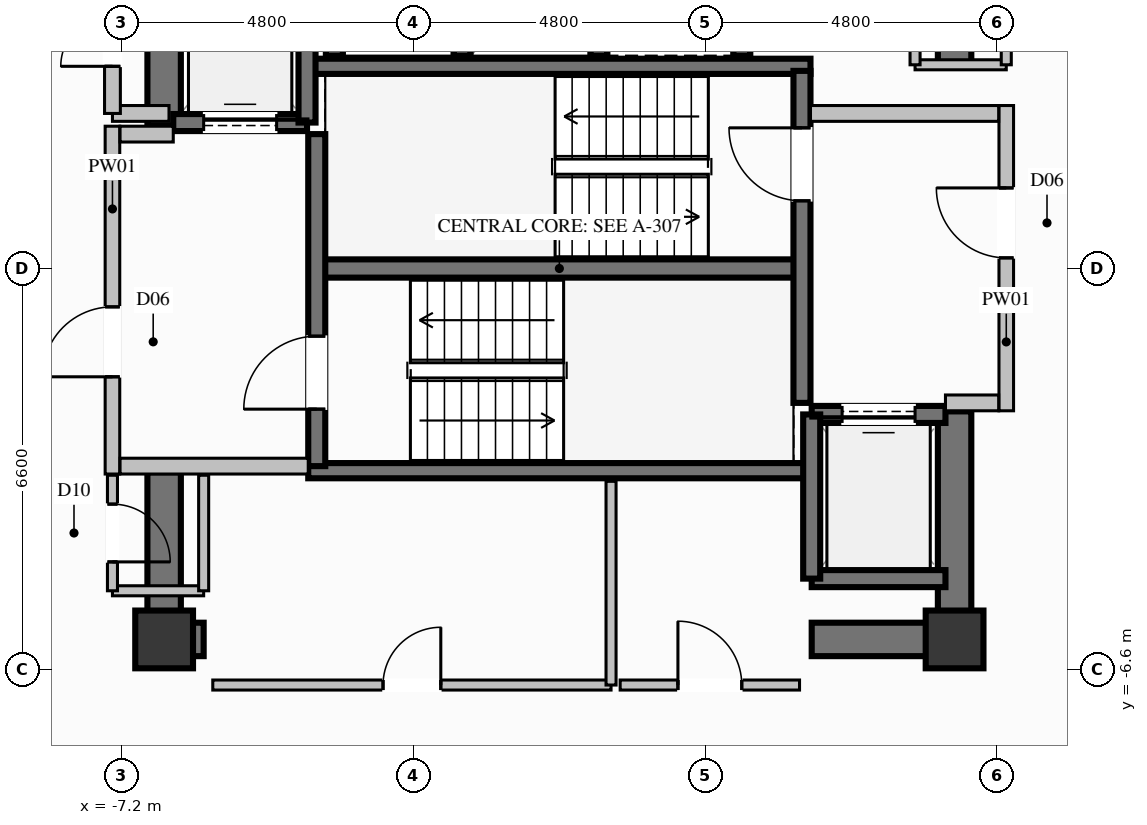
"""IFC4 building model, lengths in metres.
Left out: names, types, materials, properties, quantities, classifications, styles, units other than length and angle.
Written with IfcOpenShell. Run it as: python <this file> out.ifc"""

import sys

from ifc_helpers import new_model, si_unit, direction, frame, frame_2d, origin, origin_2d, place, context, subcontext, project, spatial, rectangle, extrude, element, fill, save


model = new_model("IFC4")
c1 = context("Model", 3, precision=1e-05, world=origin(), true_north=direction((0.0, 1.0)))
c2 = subcontext(c1, "Body", "Model", "MODEL_VIEW")
j1 = project(units=[si_unit("LENGTHUNIT", "METRE"), si_unit("PLANEANGLEUNIT", "RADIAN")], contexts=[c1])
p1 = place(None, origin())
s1 = spatial("IfcSite", under=j1, at=p1, CompositionType="ELEMENT")
p2 = place(p1, origin())
s2 = spatial("IfcBuilding", under=s1, at=p2, CompositionType="ELEMENT")
p3 = place(p2, frame((0.0, 0.0, 209.2)))
s3 = spatial("IfcBuildingStorey", under=s2, at=p3, CompositionType="ELEMENT", Elevation=209.2)
for number, where, z_axis, x_axis in (
    (1, (-6.5, -6.1, 0.0), (0.0, 0.0, 1.0), (1.0, 0.0, 0.0)),
    (2, (6.5, -6.1, 0.0), (0.0, 0.0, 1.0), (1.0, 0.0, 0.0)),
):
    element("IfcColumn", number, at=place(p3, frame(where, z_axis=z_axis, x_axis=x_axis)), inside=s3, PredefinedType="COLUMN", context=c2, shape_type="SweptSolid", body=[
        extrude(rectangle(XDim=0.95, YDim=0.95, at=origin_2d()), origin(), (0.0, 0.0, 1.0), 3.6),
    ])
p4 = place(p3, frame((-3.99, 0.0, 0.0), z_axis=(0.0, 0.0, 1.0), x_axis=(1.0, 0.0, 0.0)))
e3 = element("IfcWall", 3, at=p4, inside=s3, PredefinedType="SHEAR", context=c2, shape_type="SweptSolid", body=[
    extrude(rectangle(XDim=7.98, YDim=0.3, at=frame_2d((3.99, 0.0))), origin(), (0.0, 0.0, 1.0), 3.6),
])
for number, where, z_axis, x_axis in (
    (4, (-4.13, -3.325, 0.0), (0.0, 0.0, 1.0), (1.0, 0.0, 0.0)),
    (5, (-4.13, 3.325, 0.0), (0.0, 0.0, 1.0), (1.0, 0.0, 0.0)),
):
    element("IfcWall", number, at=place(p3, frame(where, z_axis=z_axis, x_axis=x_axis)), inside=s3, PredefinedType="SOLIDWALL", context=c2, shape_type="SweptSolid", body=[
        extrude(rectangle(XDim=8.26, YDim=0.25, at=frame_2d((4.13, 0.0))), origin(), (0.0, 0.0, 1.0), 3.6),
    ])
p5 = place(p3, frame((-6.225, -6.1, 0.0), z_axis=(0.0, 0.0, 1.0), x_axis=(1.0, 0.0, 0.0)))
e6 = element("IfcWall", 6, at=p5, inside=s3, PredefinedType="SHEAR", context=c2, shape_type="SweptSolid", body=[
    extrude(rectangle(XDim=0.375, YDim=0.55, at=frame_2d((0.188, 0.0))), origin(), (0.0, 0.0, 1.0), 3.6),
])
p6 = place(p3, frame((4.15, -6.1, 0.0), z_axis=(0.0, 0.0, 1.0), x_axis=(1.0, 0.0, 0.0)))
e7 = element("IfcWall", 7, at=p6, inside=s3, PredefinedType="SHEAR", context=c2, shape_type="SweptSolid", body=[
    extrude(rectangle(XDim=2.075, YDim=0.55, at=frame_2d((1.038, 0.0))), origin(), (0.0, 0.0, 1.0), 3.6),
])
p7 = place(p3, frame((-6.5, 2.35, 0.0), z_axis=(0.0, 0.0, 1.0), x_axis=(0.0, 1.0, 0.0)))
e8 = element("IfcWall", 8, at=p7, inside=s3, PredefinedType="SHEAR", context=c2, shape_type="SweptSolid", body=[
    extrude(rectangle(XDim=4.025, YDim=0.55, at=frame_2d((2.012, 0.0))), origin(), (0.0, 0.0, 1.0), 3.6),
])
p8 = place(p3, frame((-6.5, -6.375, 0.0), z_axis=(0.0, 0.0, 1.0), x_axis=(0.0, 1.0, 0.0)))
e9 = element("IfcWall", 9, at=p8, inside=s3, PredefinedType="SHEAR", context=c2, shape_type="SweptSolid", body=[
    extrude(rectangle(XDim=3.025, YDim=0.55, at=frame_2d((1.512, 0.0))), origin(), (0.0, 0.0, 1.0), 3.6),
])
p9 = place(p3, frame((6.5, -6.375, 0.0), z_axis=(0.0, 0.0, 1.0), x_axis=(0.0, 1.0, 0.0)))
e10 = element("IfcWall", 10, at=p9, inside=s3, PredefinedType="SHEAR", context=c2, shape_type="SweptSolid", body=[
    extrude(rectangle(XDim=4.025, YDim=0.55, at=frame_2d((2.012, 0.0))), origin(), (0.0, 0.0, 1.0), 3.6),
])
p10 = place(p3, frame((6.5, 3.35, 0.0), z_axis=(0.0, 0.0, 1.0), x_axis=(0.0, 1.0, 0.0)))
e11 = element("IfcWall", 11, at=p10, inside=s3, PredefinedType="SHEAR", context=c2, shape_type="SweptSolid", body=[
    extrude(rectangle(XDim=3.025, YDim=0.55, at=frame_2d((1.512, 0.0))), origin(), (0.0, 0.0, 1.0), 3.6),
])
for number, where, z_axis, x_axis in (
    (12, (-3.7, 6.0, 0.0), (0.0, 0.0, 1.0), (0.0, -1.0, 0.0)),
    (13, (-1.6, 3.5, 0.0), (0.0, 0.0, 1.0), (0.0, 1.0, 0.0)),
    (14, (0.65, 3.5, 0.0), (0.0, 0.0, 1.0), (0.0, 1.0, 0.0)),
    (15, (3.0, 3.5, 0.0), (0.0, 0.0, 1.0), (0.0, 1.0, 0.0)),
):
    element("IfcWall", number, at=place(p3, frame(where, z_axis=z_axis, x_axis=x_axis)), inside=s3, PredefinedType="SOLIDWALL", context=c2, shape_type="SweptSolid", body=[
        extrude(rectangle(XDim=2.5, YDim=0.28, at=frame_2d((1.25, 0.0))), origin(), (0.0, 0.0, 1.0), 3.36),
    ])
p11 = place(p3, frame((-6.35, 2.4, 0.0), z_axis=(0.0, 0.0, 1.0), x_axis=(1.0, 0.0, 0.0)))
e16 = element("IfcWall", 16, at=p11, inside=s3, PredefinedType="SOLIDWALL", context=c2, shape_type="SweptSolid", body=[
    extrude(rectangle(XDim=2.2, YDim=0.28, at=frame_2d((1.1, 0.0))), origin(), (0.0, 0.0, 1.0), 3.36),
])
p12 = place(p11, frame((0.5, 0.0, 0.0)))
e17 = element("IfcOpeningElement", 17, at=p12, cuts=e16, PredefinedType="OPENING", context=c2, shape_type="SweptSolid", body=[
    extrude(rectangle(XDim=1.2, YDim=2.2, at=frame_2d((0.6, 1.1))), frame((0.0, 0.15, 0.0), z_axis=(0.0, -1.0, 0.0), x_axis=(1.0, 0.0, 0.0)), (0.0, 0.0, 1.0), 0.3),
])
p13 = place(p3, frame((-4.15, 2.4, 0.0), z_axis=(0.0, 0.0, 1.0), x_axis=(0.0, 1.0, 0.0)))
e18 = element("IfcWall", 18, at=p13, inside=s3, PredefinedType="SOLIDWALL", context=c2, shape_type="SweptSolid", body=[
    extrude(rectangle(XDim=2.7, YDim=0.28, at=frame_2d((1.35, 0.0))), origin(), (0.0, 0.0, 1.0), 3.36),
])
p14 = place(p3, frame((4.15, -5.1, 0.0), z_axis=(0.0, 0.0, 1.0), x_axis=(1.0, 0.0, 0.0)))
e19 = element("IfcWall", 19, at=p14, inside=s3, PredefinedType="SOLIDWALL", context=c2, shape_type="SweptSolid", body=[
    extrude(rectangle(XDim=2.2, YDim=0.28, at=frame_2d((1.1, 0.0))), origin(), (0.0, 0.0, 1.0), 3.36),
])
p15 = place(p3, frame((6.35, -2.4, 0.0), z_axis=(0.0, 0.0, 1.0), x_axis=(-1.0, 0.0, 0.0)))
e20 = element("IfcWall", 20, at=p15, inside=s3, PredefinedType="SOLIDWALL", context=c2, shape_type="SweptSolid", body=[
    extrude(rectangle(XDim=2.2, YDim=0.28, at=frame_2d((1.1, 0.0))), origin(), (0.0, 0.0, 1.0), 3.36),
])
p16 = place(p15, frame((0.5, 0.0, 0.0)))
e21 = element("IfcOpeningElement", 21, at=p16, cuts=e20, PredefinedType="OPENING", context=c2, shape_type="SweptSolid", body=[
    extrude(rectangle(XDim=1.2, YDim=2.2, at=frame_2d((0.6, 1.1))), frame((0.0, 0.15, 0.0), z_axis=(0.0, -1.0, 0.0), x_axis=(1.0, 0.0, 0.0)), (0.0, 0.0, 1.0), 0.3),
])
p17 = place(p3, frame((4.15, -2.4, 0.0), z_axis=(0.0, 0.0, 1.0), x_axis=(0.0, -1.0, 0.0)))
e22 = element("IfcWall", 22, at=p17, inside=s3, PredefinedType="SOLIDWALL", context=c2, shape_type="SweptSolid", body=[
    extrude(rectangle(XDim=2.7, YDim=0.28, at=frame_2d((1.35, 0.0))), origin(), (0.0, 0.0, 1.0), 3.36),
])
p18 = place(p3, frame((-3.99, -3.25, 0.0), z_axis=(0.0, 0.0, 1.0), x_axis=(0.0, 1.0, 0.0)))
e23 = element("IfcWall", 23, at=p18, inside=s3, PredefinedType="SOLIDWALL", context=c2, shape_type="SweptSolid", body=[
    extrude(rectangle(XDim=5.46, YDim=0.28, at=frame_2d((2.73, 0.0))), origin(), (0.0, 0.0, 1.0), 3.36),
])
p19 = place(p18, frame((0.937, 0.0, 0.0)))
e24 = element("IfcOpeningElement", 24, at=p19, cuts=e23, PredefinedType="OPENING", context=c2, shape_type="SweptSolid", body=[
    extrude(rectangle(XDim=1.2, YDim=2.2, at=frame_2d((0.6, 1.1))), frame((0.0, 0.15, 0.0), z_axis=(0.0, -1.0, 0.0), x_axis=(1.0, 0.0, 0.0)), (0.0, 0.0, 1.0), 0.3),
])
p20 = place(p3, frame((3.99, -2.21, 0.0), z_axis=(0.0, 0.0, 1.0), x_axis=(0.0, 1.0, 0.0)))
e25 = element("IfcWall", 25, at=p20, inside=s3, PredefinedType="SOLIDWALL", context=c2, shape_type="SweptSolid", body=[
    extrude(rectangle(XDim=5.46, YDim=0.28, at=frame_2d((2.73, 0.0))), origin(), (0.0, 0.0, 1.0), 3.36),
])
p21 = place(p20, frame((3.323, 0.0, 0.0)))
e26 = element("IfcOpeningElement", 26, at=p21, cuts=e25, PredefinedType="OPENING", context=c2, shape_type="SweptSolid", body=[
    extrude(rectangle(XDim=1.2, YDim=2.2, at=frame_2d((0.6, 1.1))), frame((0.0, 0.15, 0.0), z_axis=(0.0, -1.0, 0.0), x_axis=(1.0, 0.0, 0.0)), (0.0, 0.0, 1.0), 0.3),
])
p22 = place(p3, frame((-7.35, -3.38, 0.0), z_axis=(0.0, 0.0, 1.0), x_axis=(0.0, 1.0, 0.0)))
e27 = element("IfcWall", 27, at=p22, inside=s3, PredefinedType="PARTITIONING", context=c2, shape_type="SweptSolid", body=[
    extrude(rectangle(XDim=5.72, YDim=0.24, at=frame_2d((2.86, 0.0))), origin(), (0.0, 0.0, 1.0), 2.445),
])
p23 = place(p22, frame((1.599, 0.0, 0.0)))
e28 = element("IfcOpeningElement", 28, at=p23, cuts=e27, PredefinedType="OPENING", context=c2, shape_type="SweptSolid", body=[
    extrude(rectangle(XDim=1.15, YDim=2.2, at=frame_2d((0.575, 1.1))), frame((0.0, 0.13, 0.0), z_axis=(0.0, -1.0, 0.0), x_axis=(1.0, 0.0, 0.0)), (0.0, 0.0, 1.0), 0.26),
])
p24 = place(p3, frame((-7.225, -3.25, 0.0), z_axis=(0.0, 0.0, 1.0), x_axis=(1.0, 0.0, 0.0)))
e29 = element("IfcWall", 29, at=p24, inside=s3, PredefinedType="PARTITIONING", context=c2, shape_type="SweptSolid", body=[
    extrude(rectangle(XDim=3.095, YDim=0.26, at=frame_2d((1.548, 0.0))), origin(), (0.0, 0.0, 1.0), 3.36),
])
p25 = place(p3, frame((-7.225, 2.21, 0.0), z_axis=(0.0, 0.0, 1.0), x_axis=(1.0, 0.0, 0.0)))
e30 = element("IfcWall", 30, at=p25, inside=s3, PredefinedType="PARTITIONING", context=c2, shape_type="SweptSolid", body=[
    extrude(rectangle(XDim=0.875, YDim=0.26, at=frame_2d((0.438, 0.0))), origin(), (0.0, 0.0, 1.0), 3.36),
])
p26 = place(p3, frame((7.35, -2.34, 0.0), z_axis=(0.0, 0.0, 1.0), x_axis=(0.0, 1.0, 0.0)))
e31 = element("IfcWall", 31, at=p26, inside=s3, PredefinedType="PARTITIONING", context=c2, shape_type="SweptSolid", body=[
    extrude(rectangle(XDim=5.02, YDim=0.24, at=frame_2d((2.51, 0.0))), origin(), (0.0, 0.0, 1.0), 2.445),
])
p27 = place(p26, frame((2.515, 0.0, 0.0)))
e32 = element("IfcOpeningElement", 32, at=p27, cuts=e31, PredefinedType="OPENING", context=c2, shape_type="SweptSolid", body=[
    extrude(rectangle(XDim=1.15, YDim=2.2, at=frame_2d((0.575, 1.1))), frame((0.0, 0.13, 0.0), z_axis=(0.0, -1.0, 0.0), x_axis=(1.0, 0.0, 0.0)), (0.0, 0.0, 1.0), 0.26),
])
p28 = place(p3, frame((6.35, -2.21, 0.0), z_axis=(0.0, 0.0, 1.0), x_axis=(1.0, 0.0, 0.0)))
e33 = element("IfcWall", 33, at=p28, inside=s3, PredefinedType="PARTITIONING", context=c2, shape_type="SweptSolid", body=[
    extrude(rectangle(XDim=0.875, YDim=0.26, at=frame_2d((0.438, 0.0))), origin(), (0.0, 0.0, 1.0), 3.36),
])
p29 = place(p3, frame((4.13, 2.55, 0.0), z_axis=(0.0, 0.0, 1.0), x_axis=(1.0, 0.0, 0.0)))
e34 = element("IfcWall", 34, at=p29, inside=s3, PredefinedType="PARTITIONING", context=c2, shape_type="SweptSolid", body=[
    extrude(rectangle(XDim=3.095, YDim=0.26, at=frame_2d((1.548, 0.0))), origin(), (0.0, 0.0, 1.0), 3.36),
])
p30 = place(p3, frame((-7.35, 2.55, 0.0), z_axis=(0.0, 0.0, 1.0), x_axis=(1.0, 0.0, 0.0)))
e35 = element("IfcWall", 35, at=p30, inside=s3, PredefinedType="PARTITIONING", context=c2, shape_type="SweptSolid", body=[
    extrude(rectangle(XDim=0.93, YDim=0.26, at=frame_2d((0.465, 0.0))), origin(), (0.0, 0.0, 1.0), 3.36),
])
p31 = place(p3, frame((-7.35, 2.55, 0.0), z_axis=(0.0, 0.0, 1.0), x_axis=(0.0, 1.0, 0.0)))
e36 = element("IfcWall", 36, at=p31, inside=s3, PredefinedType="PARTITIONING", context=c2, shape_type="SweptSolid", body=[
    extrude(rectangle(XDim=2.4, YDim=0.26, at=frame_2d((1.2, 0.0))), origin(), (0.0, 0.0, 1.0), 2.445),
])
p32 = place(p31, frame((0.775, 0.0, 0.0)))
e37 = element("IfcOpeningElement", 37, at=p32, cuts=e36, PredefinedType="OPENING", context=c2, shape_type="SweptSolid", body=[
    extrude(rectangle(XDim=0.85, YDim=2.05, at=frame_2d((0.425, 1.025))), frame((0.0, 0.14, 0.0), z_axis=(0.0, -1.0, 0.0), x_axis=(1.0, 0.0, 0.0)), (0.0, 0.0, 1.0), 0.28),
])
p33 = place(p3, frame((-7.35, -5.3, 0.0), z_axis=(0.0, 0.0, 1.0), x_axis=(1.0, 0.0, 0.0)))
e38 = element("IfcWall", 38, at=p33, inside=s3, PredefinedType="PARTITIONING", context=c2, shape_type="SweptSolid", body=[
    extrude(rectangle(XDim=1.5, YDim=0.165, at=frame_2d((0.75, 0.0))), origin(), (0.0, 0.0, 1.0), 2.445),
])
p34 = place(p3, frame((-5.85, -5.3, 0.0), z_axis=(0.0, 0.0, 1.0), x_axis=(0.0, 1.0, 0.0)))
e39 = element("IfcWall", 39, at=p34, inside=s3, PredefinedType="PARTITIONING", context=c2, shape_type="SweptSolid", body=[
    extrude(rectangle(XDim=1.9, YDim=0.165, at=frame_2d((0.95, 0.0))), origin(), (0.0, 0.0, 1.0), 2.445),
])
p35 = place(p3, frame((-7.35, -3.4, 0.0), z_axis=(0.0, 0.0, 1.0), x_axis=(0.0, -1.0, 0.0)))
e40 = element("IfcWall", 40, at=p35, inside=s3, PredefinedType="PARTITIONING", context=c2, shape_type="SweptSolid", body=[
    extrude(rectangle(XDim=1.9, YDim=0.165, at=frame_2d((0.95, 0.0))), origin(), (0.0, 0.0, 1.0), 3.36),
])
p36 = place(p35, frame((0.475, 0.0, 0.0)))
e41 = element("IfcOpeningElement", 41, at=p36, cuts=e40, PredefinedType="OPENING", context=c2, shape_type="SweptSolid", body=[
    extrude(rectangle(XDim=0.95, YDim=2.1, at=frame_2d((0.475, 1.05))), frame((0.0, 0.093, 0.0), z_axis=(0.0, -1.0, 0.0), x_axis=(1.0, 0.0, 0.0)), (0.0, 0.0, 1.0), 0.185),
])
p37 = place(p3, frame((5.85, 3.35, 0.0), z_axis=(0.0, 0.0, 1.0), x_axis=(1.0, 0.0, 0.0)))
e42 = element("IfcWall", 42, at=p37, inside=s3, PredefinedType="PARTITIONING", context=c2, shape_type="SweptSolid", body=[
    extrude(rectangle(XDim=1.5, YDim=0.165, at=frame_2d((0.75, 0.0))), origin(), (0.0, 0.0, 1.0), 3.36),
])
p38 = place(p3, frame((7.35, 3.35, 0.0), z_axis=(0.0, 0.0, 1.0), x_axis=(0.0, 1.0, 0.0)))
e43 = element("IfcWall", 43, at=p38, inside=s3, PredefinedType="PARTITIONING", context=c2, shape_type="SweptSolid", body=[
    extrude(rectangle(XDim=1.95, YDim=0.165, at=frame_2d((0.975, 0.0))), origin(), (0.0, 0.0, 1.0), 3.36),
])
p39 = place(p38, frame((0.5, 0.0, 0.0)))
e44 = element("IfcOpeningElement", 44, at=p39, cuts=e43, PredefinedType="OPENING", context=c2, shape_type="SweptSolid", body=[
    extrude(rectangle(XDim=0.95, YDim=2.1, at=frame_2d((0.475, 1.05))), frame((0.0, 0.093, 0.0), z_axis=(0.0, -1.0, 0.0), x_axis=(1.0, 0.0, 0.0)), (0.0, 0.0, 1.0), 0.185),
])
p40 = place(p3, frame((5.85, 5.3, 0.0), z_axis=(0.0, 0.0, 1.0), x_axis=(0.0, -1.0, 0.0)))
e45 = element("IfcWall", 45, at=p40, inside=s3, PredefinedType="PARTITIONING", context=c2, shape_type="SweptSolid", body=[
    extrude(rectangle(XDim=1.95, YDim=0.165, at=frame_2d((0.975, 0.0))), origin(), (0.0, 0.0, 1.0), 2.445),
])
p41 = place(p3, frame((-5.7, -6.85, 0.0), z_axis=(0.0, 0.0, 1.0), x_axis=(1.0, 0.0, 0.0)))
e46 = element("IfcWall", 46, at=p41, inside=s3, PredefinedType="PARTITIONING", context=c2, shape_type="SweptSolid", body=[
    extrude(rectangle(XDim=6.55, YDim=0.165, at=frame_2d((3.275, 0.0))), origin(), (0.0, 0.0, 1.0), 2.445),
])
p42 = place(p41, frame((2.8, 0.0, 0.0)))
e47 = element("IfcOpeningElement", 47, at=p42, cuts=e46, PredefinedType="OPENING", context=c2, shape_type="SweptSolid", body=[
    extrude(rectangle(XDim=0.95, YDim=2.1, at=frame_2d((0.475, 1.05))), frame((0.0, 0.093, 0.0), z_axis=(0.0, -1.0, 0.0), x_axis=(1.0, 0.0, 0.0)), (0.0, 0.0, 1.0), 0.185),
])
p43 = place(p3, frame((0.85, -6.85, 0.0), z_axis=(0.0, 0.0, 1.0), x_axis=(0.0, 1.0, 0.0)))
e48 = element("IfcWall", 48, at=p43, inside=s3, PredefinedType="PARTITIONING", context=c2, shape_type="SweptSolid", body=[
    extrude(rectangle(XDim=3.35, YDim=0.165, at=frame_2d((1.675, 0.0))), origin(), (0.0, 0.0, 1.0), 3.36),
])
p44 = place(p3, frame((1.0, -6.85, 0.0), z_axis=(0.0, 0.0, 1.0), x_axis=(1.0, 0.0, 0.0)))
e49 = element("IfcWall", 49, at=p44, inside=s3, PredefinedType="PARTITIONING", context=c2, shape_type="SweptSolid", body=[
    extrude(rectangle(XDim=2.95, YDim=0.165, at=frame_2d((1.475, 0.0))), origin(), (0.0, 0.0, 1.0), 2.445),
])
p45 = place(p44, frame((0.95, 0.0, 0.0)))
e50 = element("IfcOpeningElement", 50, at=p45, cuts=e49, PredefinedType="OPENING", context=c2, shape_type="SweptSolid", body=[
    extrude(rectangle(XDim=1.05, YDim=2.15, at=frame_2d((0.525, 1.075))), frame((0.0, 0.093, 0.0), z_axis=(0.0, -1.0, 0.0), x_axis=(1.0, 0.0, 0.0)), (0.0, 0.0, 1.0), 0.185),
])
p46 = place(p12, origin())
e51 = element("IfcDoor", 51, at=p46, inside=s3, OperationType="SLIDING_TO_LEFT", PredefinedType="DOOR", context=c2, shape_type="SweptSolid", body=[
    extrude(rectangle(XDim=1.2, YDim=2.2, at=frame_2d((0.6, 1.1))), frame((0.0, 0.025, 0.0), z_axis=(0.0, -1.0, 0.0), x_axis=(1.0, 0.0, 0.0)), (0.0, 0.0, 1.0), 0.05),
])
fill(e17, e51)
p47 = place(p16, origin())
e52 = element("IfcDoor", 52, at=p47, inside=s3, OperationType="SLIDING_TO_LEFT", PredefinedType="DOOR", context=c2, shape_type="SweptSolid", body=[
    extrude(rectangle(XDim=1.2, YDim=2.2, at=frame_2d((0.6, 1.1))), frame((0.0, 0.025, 0.0), z_axis=(0.0, -1.0, 0.0), x_axis=(1.0, 0.0, 0.0)), (0.0, 0.0, 1.0), 0.05),
])
fill(e21, e52)
p48 = place(p19, origin())
e53 = element("IfcDoor", 53, at=p48, inside=s3, OperationType="SINGLE_SWING_LEFT", PredefinedType="DOOR", context=c2, shape_type="SweptSolid", body=[
    extrude(rectangle(XDim=1.2, YDim=2.2, at=frame_2d((0.6, 1.1))), frame((0.0, 0.025, 0.0), z_axis=(0.0, -1.0, 0.0), x_axis=(1.0, 0.0, 0.0)), (0.0, 0.0, 1.0), 0.05),
])
fill(e24, e53)
p49 = place(p21, origin())
e54 = element("IfcDoor", 54, at=p49, inside=s3, OperationType="SINGLE_SWING_RIGHT", PredefinedType="DOOR", context=c2, shape_type="SweptSolid", body=[
    extrude(rectangle(XDim=1.2, YDim=2.2, at=frame_2d((0.6, 1.1))), frame((0.0, 0.025, 0.0), z_axis=(0.0, -1.0, 0.0), x_axis=(1.0, 0.0, 0.0)), (0.0, 0.0, 1.0), 0.05),
])
fill(e26, e54)
p50 = place(p23, origin())
e55 = element("IfcDoor", 55, at=p50, inside=s3, OperationType="SINGLE_SWING_LEFT", PredefinedType="DOOR", context=c2, shape_type="SweptSolid", body=[
    extrude(rectangle(XDim=1.15, YDim=2.2, at=frame_2d((0.575, 1.1))), frame((0.0, 0.025, 0.0), z_axis=(0.0, -1.0, 0.0), x_axis=(1.0, 0.0, 0.0)), (0.0, 0.0, 1.0), 0.05),
])
fill(e28, e55)
p51 = place(p27, origin())
e56 = element("IfcDoor", 56, at=p51, inside=s3, OperationType="SINGLE_SWING_RIGHT", PredefinedType="DOOR", context=c2, shape_type="SweptSolid", body=[
    extrude(rectangle(XDim=1.15, YDim=2.2, at=frame_2d((0.575, 1.1))), frame((0.0, 0.025, 0.0), z_axis=(0.0, -1.0, 0.0), x_axis=(1.0, 0.0, 0.0)), (0.0, 0.0, 1.0), 0.05),
])
fill(e32, e56)
p52 = place(p32, origin())
e57 = element("IfcDoor", 57, at=p52, inside=s3, OperationType="SINGLE_SWING_LEFT", PredefinedType="DOOR", context=c2, shape_type="SweptSolid", body=[
    extrude(rectangle(XDim=0.85, YDim=2.05, at=frame_2d((0.425, 1.025))), frame((0.0, 0.025, 0.0), z_axis=(0.0, -1.0, 0.0), x_axis=(1.0, 0.0, 0.0)), (0.0, 0.0, 1.0), 0.05),
])
fill(e37, e57)
p53 = place(p36, origin())
e58 = element("IfcDoor", 58, at=p53, inside=s3, OperationType="SINGLE_SWING_RIGHT", PredefinedType="DOOR", context=c2, shape_type="SweptSolid", body=[
    extrude(rectangle(XDim=0.95, YDim=2.1, at=frame_2d((0.475, 1.05))), frame((0.0, 0.025, 0.0), z_axis=(0.0, -1.0, 0.0), x_axis=(1.0, 0.0, 0.0)), (0.0, 0.0, 1.0), 0.05),
])
fill(e41, e58)
p54 = place(p42, origin())
e59 = element("IfcDoor", 59, at=p54, inside=s3, OperationType="SINGLE_SWING_RIGHT", PredefinedType="DOOR", context=c2, shape_type="SweptSolid", body=[
    extrude(rectangle(XDim=0.95, YDim=2.1, at=frame_2d((0.475, 1.05))), frame((0.0, 0.025, 0.0), z_axis=(0.0, -1.0, 0.0), x_axis=(1.0, 0.0, 0.0)), (0.0, 0.0, 1.0), 0.05),
])
fill(e47, e59)
p55 = place(p45, origin())
e60 = element("IfcDoor", 60, at=p55, inside=s3, OperationType="SINGLE_SWING_LEFT", PredefinedType="DOOR", context=c2, shape_type="SweptSolid", body=[
    extrude(rectangle(XDim=1.05, YDim=2.15, at=frame_2d((0.525, 1.075))), frame((0.0, 0.025, 0.0), z_axis=(0.0, -1.0, 0.0), x_axis=(1.0, 0.0, 0.0)), (0.0, 0.0, 1.0), 0.05),
])
fill(e50, e60)
save(model, sys.argv[1])
